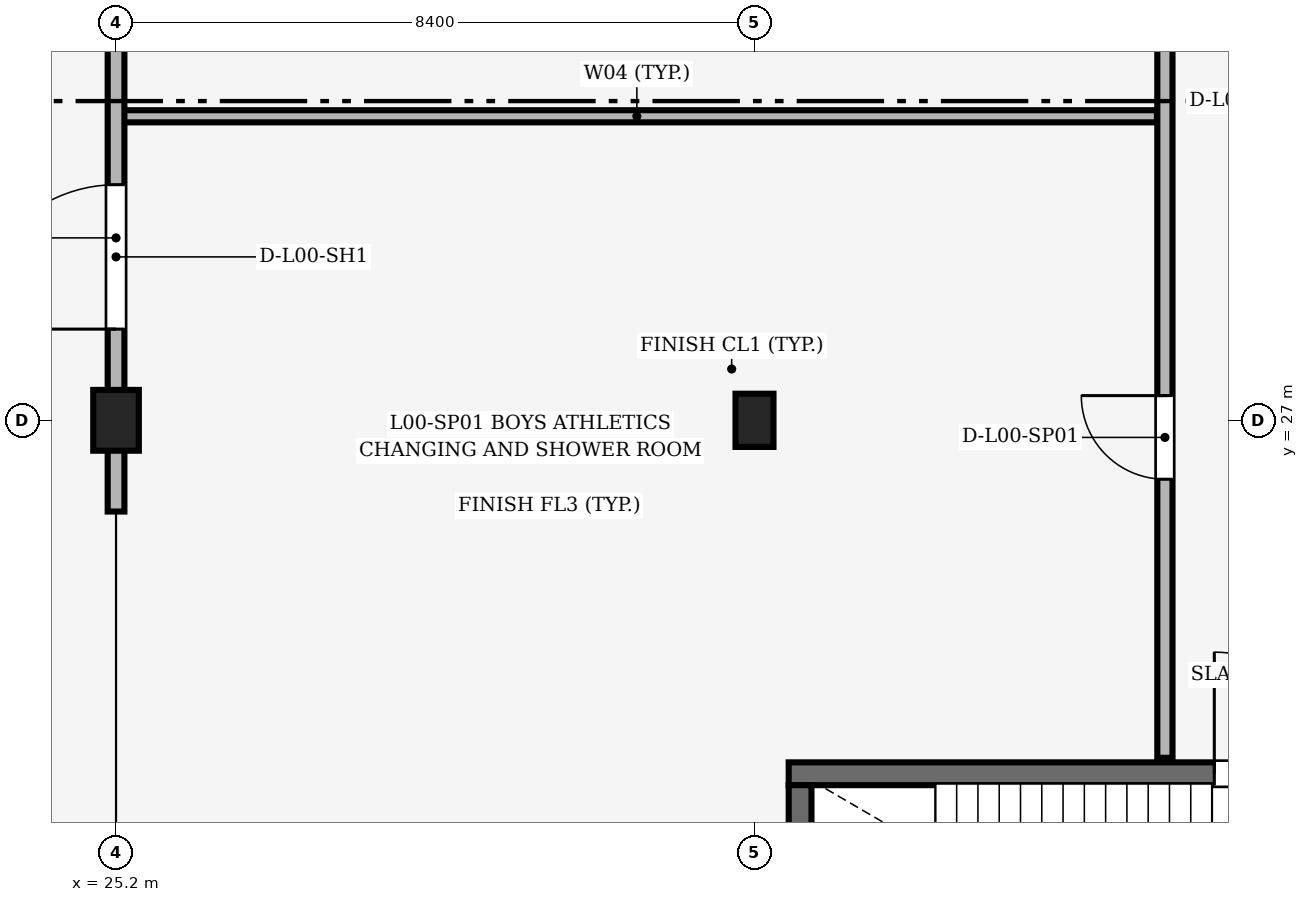
"""IFC4 building model, lengths in metres.
Left out: names, types, materials, properties, quantities, classifications, styles, units other than length and angle.
Written with IfcOpenShell. Run it as: python <this file> out.ifc"""

import sys

from ifc_helpers import new_model, si_unit, direction, frame, frame_2d, origin, origin_2d, place, context, subcontext, project, spatial, rectangle, extrude, element, fill, save


model = new_model("IFC4")
c1 = context("Model", 3, precision=1e-05, world=origin(), true_north=direction((0.0, 1.0)))
c2 = subcontext(c1, "Body", "Model", "MODEL_VIEW")
j1 = project(units=[si_unit("LENGTHUNIT", "METRE"), si_unit("PLANEANGLEUNIT", "RADIAN")], contexts=[c1])
p1 = place(None, origin())
s1 = spatial("IfcSite", under=j1, at=p1, CompositionType="ELEMENT")
p2 = place(p1, origin())
s2 = spatial("IfcBuilding", under=s1, at=p2, CompositionType="ELEMENT")
p3 = place(p2, origin())
s3 = spatial("IfcBuildingStorey", under=s2, at=p3, CompositionType="ELEMENT", Elevation=0.0)
p4 = place(p3, frame((25.2, 27.0, 0.0), z_axis=(0.0, 0.0, 1.0), x_axis=(1.0, 0.0, 0.0)))
e1 = element("IfcColumn", 1, at=p4, inside=s3, PredefinedType="COLUMN", context=c2, shape_type="SweptSolid", body=[
    extrude(rectangle(XDim=0.6, YDim=0.8, at=origin_2d()), origin(), (0.0, 0.0, 1.0), 4.8),
])
p5 = place(p3, frame((33.6, 27.0, 0.0), z_axis=(0.0, 0.0, 1.0), x_axis=(1.0, 0.0, 0.0)))
e2 = element("IfcColumn", 2, at=p5, inside=s3, PredefinedType="COLUMN", context=c2, shape_type="SweptSolid", body=[
    extrude(rectangle(XDim=0.5, YDim=0.7, at=origin_2d()), origin(), (0.0, 0.0, 1.0), 4.8),
])
p6 = place(p3, frame((34.05, 22.35, 0.0), z_axis=(0.0, 0.0, 1.0), x_axis=(1.0, 0.0, 0.0)))
e3 = element("IfcWall", 3, at=p6, inside=s3, PredefinedType="SHEAR", context=c2, shape_type="SweptSolid", body=[
    extrude(rectangle(XDim=7.5, YDim=0.3, at=frame_2d((3.75, 0.0))), origin(), (0.0, 0.0, 1.0), 4.625),
])
p7 = place(p6, frame((5.6, 0.0, 0.0)))
e4 = element("IfcOpeningElement", 4, at=p7, cuts=e3, PredefinedType="OPENING", context=c2, shape_type="SweptSolid", body=[
    extrude(rectangle(XDim=1.6, YDim=2.2, at=frame_2d((0.8, 1.1))), frame((0.0, 0.16, 0.0), z_axis=(0.0, -1.0, 0.0), x_axis=(1.0, 0.0, 0.0)), (0.0, 0.0, 1.0), 0.32),
])
p8 = place(p3, frame((34.2, 18.3, 0.0), z_axis=(0.0, 0.0, 1.0), x_axis=(0.0, 1.0, 0.0)))
e5 = element("IfcWall", 5, at=p8, inside=s3, PredefinedType="SHEAR", context=c2, shape_type="SweptSolid", body=[
    extrude(rectangle(XDim=3.9, YDim=0.3, at=frame_2d((1.95, 0.0))), origin(), (0.0, 0.0, 1.0), 4.625),
])
p9 = place(p3, frame((25.21, 31.0, 0.0), z_axis=(0.0, 0.0, 1.0), x_axis=(1.0, 0.0, 0.0)))
e6 = element("IfcWall", 6, at=p9, inside=s3, PredefinedType="PARTITIONING", context=c2, shape_type="SweptSolid", body=[
    extrude(rectangle(XDim=13.685, YDim=0.16, at=frame_2d((6.843, 0.0))), origin(), (0.0, 0.0, 1.0), 4.5),
])
p10 = place(p3, frame((39.0, 22.56, 0.0), z_axis=(0.0, 0.0, 1.0), x_axis=(0.0, 1.0, 0.0)))
e7 = element("IfcWall", 7, at=p10, inside=s3, PredefinedType="PARTITIONING", context=c2, shape_type="SweptSolid", body=[
    extrude(rectangle(XDim=29.535, YDim=0.2, at=frame_2d((14.768, 0.0))), origin(), (0.0, 0.0, 1.0), 4.5),
])
p11 = place(p10, frame((3.665, 0.0, 0.0)))
e8 = element("IfcOpeningElement", 8, at=p11, cuts=e7, PredefinedType="OPENING", context=c2, shape_type="SweptSolid", body=[
    extrude(rectangle(XDim=1.1, YDim=2.15, at=frame_2d((0.55, 1.075))), frame((0.0, 0.11, 0.0), z_axis=(0.0, -1.0, 0.0), x_axis=(1.0, 0.0, 0.0)), (0.0, 0.0, 1.0), 0.22),
])
p12 = place(p10, frame((12.19, 0.0, 0.0)))
e9 = element("IfcOpeningElement", 9, at=p12, cuts=e7, PredefinedType="OPENING", context=c2, shape_type="SweptSolid", body=[
    extrude(rectangle(XDim=1.1, YDim=2.15, at=frame_2d((0.55, 1.075))), frame((0.0, 0.11, 0.0), z_axis=(0.0, -1.0, 0.0), x_axis=(1.0, 0.0, 0.0)), (0.0, 0.0, 1.0), 0.22),
])
p13 = place(p10, frame((20.04, 0.0, 0.0)))
e10 = element("IfcOpeningElement", 10, at=p13, cuts=e7, PredefinedType="OPENING", context=c2, shape_type="SweptSolid", body=[
    extrude(rectangle(XDim=1.2, YDim=2.2, at=frame_2d((0.6, 1.1))), frame((0.0, 0.11, 0.0), z_axis=(0.0, -1.0, 0.0), x_axis=(1.0, 0.0, 0.0)), (0.0, 0.0, 1.0), 0.22),
])
p14 = place(p10, frame((26.39, 0.0, 0.0)))
e11 = element("IfcOpeningElement", 11, at=p14, cuts=e7, PredefinedType="OPENING", context=c2, shape_type="SweptSolid", body=[
    extrude(rectangle(XDim=1.1, YDim=2.15, at=frame_2d((0.55, 1.075))), frame((0.0, 0.11, 0.0), z_axis=(0.0, -1.0, 0.0), x_axis=(1.0, 0.0, 0.0)), (0.0, 0.0, 1.0), 0.22),
])
p15 = place(p3, frame((25.2, 25.8, 0.0), z_axis=(0.0, 0.0, 1.0), x_axis=(0.0, 1.0, 0.0)))
e12 = element("IfcWall", 12, at=p15, inside=s3, PredefinedType="SOLIDWALL", context=c2, shape_type="SweptSolid", body=[
    extrude(rectangle(XDim=7.2, YDim=0.22, at=frame_2d((3.6, 0.0))), origin(), (0.0, 0.0, 1.0), 3.912),
])
p16 = place(p15, frame((2.4, 0.0, 0.0)))
e13 = element("IfcOpeningElement", 13, at=p16, cuts=e12, PredefinedType="OPENING", context=c2, shape_type="SweptSolid", body=[
    extrude(rectangle(XDim=1.9, YDim=2.4, at=frame_2d((0.95, 1.2))), frame((0.0, 0.12, 0.0), z_axis=(0.0, -1.0, 0.0), x_axis=(1.0, 0.0, 0.0)), (0.0, 0.0, 1.0), 0.24),
])
p17 = place(p7, origin())
e14 = element("IfcDoor", 14, at=p17, inside=s3, OperationType="DOUBLE_DOOR_SINGLE_SWING", PredefinedType="DOOR", context=c2, shape_type="SweptSolid", body=[
    extrude(rectangle(XDim=1.6, YDim=2.2, at=frame_2d((0.8, 1.1))), frame((0.0, 0.025, 0.0), z_axis=(0.0, -1.0, 0.0), x_axis=(1.0, 0.0, 0.0)), (0.0, 0.0, 1.0), 0.05),
])
fill(e4, e14)
p18 = place(p11, origin())
e15 = element("IfcDoor", 15, at=p18, inside=s3, OperationType="SINGLE_SWING_RIGHT", PredefinedType="DOOR", context=c2, shape_type="SweptSolid", body=[
    extrude(rectangle(XDim=1.1, YDim=2.15, at=frame_2d((0.55, 1.075))), frame((0.0, 0.025, 0.0), z_axis=(0.0, -1.0, 0.0), x_axis=(1.0, 0.0, 0.0)), (0.0, 0.0, 1.0), 0.05),
])
fill(e8, e15)
p19 = place(p16, origin())
e16 = element("IfcDoor", 16, at=p19, inside=s3, OperationType="DOUBLE_DOOR_SINGLE_SWING", PredefinedType="DOOR", context=c2, shape_type="SweptSolid", body=[
    extrude(rectangle(XDim=1.9, YDim=2.4, at=frame_2d((0.95, 1.2))), frame((0.0, 0.025, 0.0), z_axis=(0.0, -1.0, 0.0), x_axis=(1.0, 0.0, 0.0)), (0.0, 0.0, 1.0), 0.05),
])
fill(e13, e16)
save(model, sys.argv[1])
